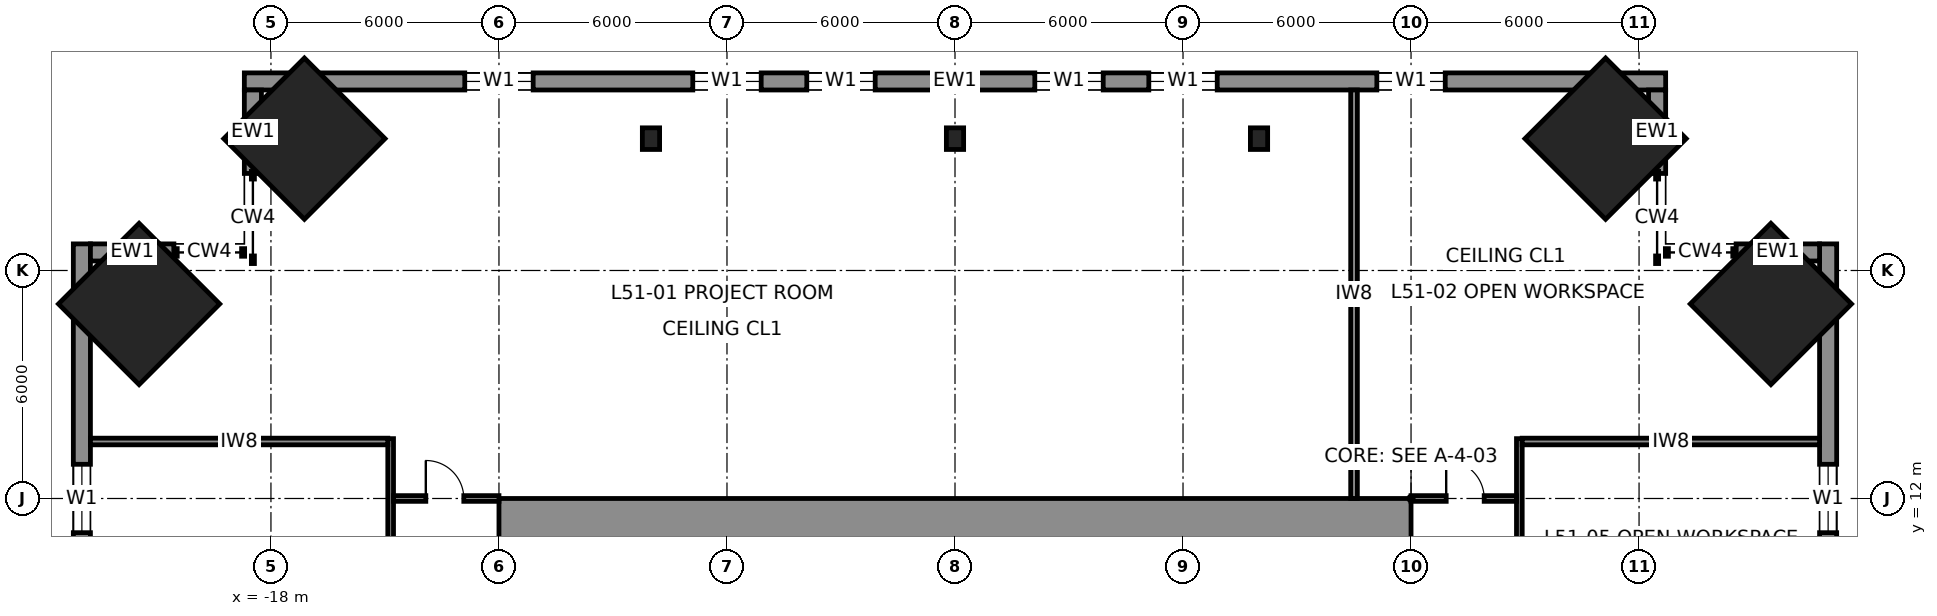
"""IFC4 building model, lengths in metres.
Left out: names, types, materials, properties, quantities, classifications, styles, units other than length and angle.
Written with IfcOpenShell. Run it as: python <this file> out.ifc"""

import sys

from ifc_helpers import new_model, si_unit, direction, frame, frame_2d, origin, origin_2d, place, context, subcontext, project, spatial, rectangle, i_section, extrude, element, fill, save


model = new_model("IFC4")
c1 = context("Model", 3, precision=1e-05, world=origin(), true_north=direction((0.0, 1.0)))
c2 = subcontext(c1, "Body", "Model", "MODEL_VIEW")
j1 = project(units=[si_unit("LENGTHUNIT", "METRE"), si_unit("PLANEANGLEUNIT", "RADIAN")], contexts=[c1])
p1 = place(None, origin())
s1 = spatial("IfcSite", under=j1, at=p1, CompositionType="ELEMENT")
p2 = place(p1, origin())
s2 = spatial("IfcBuilding", under=s1, at=p2, CompositionType="ELEMENT")
p3 = place(p2, frame((0.0, 0.0, 233.8)))
s3 = spatial("IfcBuildingStorey", under=s2, at=p3, CompositionType="ELEMENT", Elevation=233.8)
for number, where, z_axis, x_axis in (
    (1, (17.119, 21.469, 0.0), (-0.04, -0.04, 0.998), (0.707, -0.708, 0.0)),
    (2, (21.469, 17.119, 0.0), (-0.04, -0.04, 0.998), (0.708, -0.707, 0.0)),
    (3, (-21.469, 17.119, 0.0), (0.04, -0.04, 0.998), (0.708, 0.707, 0.0)),
    (4, (-17.119, 21.469, 0.0), (0.04, -0.04, 0.998), (0.707, 0.708, 0.0)),
):
    element("IfcColumn", number, at=place(p3, frame(where, z_axis=z_axis, x_axis=x_axis)), inside=s3, PredefinedType="COLUMN", context=c2, shape_type="SweptSolid", body=[
        extrude(rectangle(XDim=3.0, YDim=3.0, at=origin_2d()), origin(), (0.0, 0.0, 1.0), 4.007),
    ])
for number, where, z_axis, x_axis in (
    (5, (0.0, 21.469, 0.0), (0.0, -0.04, 0.999), (1.0, 0.0, 0.0)),
    (6, (8.0, 21.469, 0.0), (0.0, -0.04, 0.999), (1.0, 0.0, 0.0)),
    (7, (-8.0, 21.469, 0.0), (0.0, -0.04, 0.999), (1.0, 0.0, 0.0)),
):
    element("IfcColumn", number, at=place(p3, frame(where, z_axis=z_axis, x_axis=x_axis)), inside=s3, PredefinedType="COLUMN", context=c2, shape_type="SweptSolid", body=[
        extrude(i_section(OverallWidth=0.454, OverallDepth=0.569, WebThickness=0.078, FlangeThickness=0.125, at=origin_2d()), origin(), (0.0, 0.0, 1.0), 4.003),
    ])
p4 = place(p3, frame((-12.0, 11.25, 0.0), z_axis=(0.0, 0.0, 1.0), x_axis=(1.0, 0.0, 0.0)))
e8 = element("IfcWall", 8, at=p4, inside=s3, PredefinedType="SHEAR", context=c2, shape_type="SweptSolid", body=[
    extrude(rectangle(XDim=24.0, YDim=1.5, at=frame_2d((12.0, 0.0))), origin(), (0.0, 0.0, 1.0), 4.0),
])
p5 = place(p3, frame((18.7, 22.975, 0.0), z_axis=(0.0, 0.0, 1.0), x_axis=(-1.0, 0.0, 0.0)))
e9 = element("IfcWall", 9, at=p5, inside=s3, PredefinedType="SOLIDWALL", context=c2, shape_type="SweptSolid", body=[
    extrude(rectangle(XDim=37.4, YDim=0.45, at=frame_2d((18.7, 0.0))), origin(), (0.0, 0.0, 1.0), 3.83),
])
p6 = place(p5, frame((5.8, 0.0, 0.7)))
e10 = element("IfcOpeningElement", 10, at=p6, cuts=e9, PredefinedType="OPENING", context=c2, shape_type="SweptSolid", body=[
    extrude(rectangle(XDim=1.8, YDim=2.6, at=frame_2d((0.9, 1.3))), frame((0.0, 0.235, 0.0), z_axis=(0.0, -1.0, 0.0), x_axis=(1.0, 0.0, 0.0)), (0.0, 0.0, 1.0), 0.47),
])
p7 = place(p5, frame((11.8, 0.0, 0.7)))
e11 = element("IfcOpeningElement", 11, at=p7, cuts=e9, PredefinedType="OPENING", context=c2, shape_type="SweptSolid", body=[
    extrude(rectangle(XDim=1.8, YDim=2.6, at=frame_2d((0.9, 1.3))), frame((0.0, 0.235, 0.0), z_axis=(0.0, -1.0, 0.0), x_axis=(1.0, 0.0, 0.0)), (0.0, 0.0, 1.0), 0.47),
])
p8 = place(p5, frame((14.8, 0.0, 0.7)))
e12 = element("IfcOpeningElement", 12, at=p8, cuts=e9, PredefinedType="OPENING", context=c2, shape_type="SweptSolid", body=[
    extrude(rectangle(XDim=1.8, YDim=2.6, at=frame_2d((0.9, 1.3))), frame((0.0, 0.235, 0.0), z_axis=(0.0, -1.0, 0.0), x_axis=(1.0, 0.0, 0.0)), (0.0, 0.0, 1.0), 0.47),
])
p9 = place(p5, frame((20.8, 0.0, 0.7)))
e13 = element("IfcOpeningElement", 13, at=p9, cuts=e9, PredefinedType="OPENING", context=c2, shape_type="SweptSolid", body=[
    extrude(rectangle(XDim=1.8, YDim=2.6, at=frame_2d((0.9, 1.3))), frame((0.0, 0.235, 0.0), z_axis=(0.0, -1.0, 0.0), x_axis=(1.0, 0.0, 0.0)), (0.0, 0.0, 1.0), 0.47),
])
p10 = place(p5, frame((23.8, 0.0, 0.7)))
e14 = element("IfcOpeningElement", 14, at=p10, cuts=e9, PredefinedType="OPENING", context=c2, shape_type="SweptSolid", body=[
    extrude(rectangle(XDim=1.8, YDim=2.6, at=frame_2d((0.9, 1.3))), frame((0.0, 0.235, 0.0), z_axis=(0.0, -1.0, 0.0), x_axis=(1.0, 0.0, 0.0)), (0.0, 0.0, 1.0), 0.47),
])
p11 = place(p5, frame((29.8, 0.0, 0.7)))
e15 = element("IfcOpeningElement", 15, at=p11, cuts=e9, PredefinedType="OPENING", context=c2, shape_type="SweptSolid", body=[
    extrude(rectangle(XDim=1.8, YDim=2.6, at=frame_2d((0.9, 1.3))), frame((0.0, 0.235, 0.0), z_axis=(0.0, -1.0, 0.0), x_axis=(1.0, 0.0, 0.0)), (0.0, 0.0, 1.0), 0.47),
])
p12 = place(p3, frame((22.975, -18.7, 0.0), z_axis=(0.0, 0.0, 1.0), x_axis=(0.0, 1.0, 0.0)))
e16 = element("IfcWall", 16, at=p12, inside=s3, PredefinedType="SOLIDWALL", context=c2, shape_type="SweptSolid", body=[
    extrude(rectangle(XDim=37.4, YDim=0.45, at=frame_2d((18.7, 0.0))), origin(), (0.0, 0.0, 1.0), 3.83),
])
p13 = place(p12, frame((5.8, 0.0, 0.7)))
e17 = element("IfcOpeningElement", 17, at=p13, cuts=e16, PredefinedType="OPENING", context=c2, shape_type="SweptSolid", body=[
    extrude(rectangle(XDim=1.8, YDim=2.6, at=frame_2d((0.9, 1.3))), frame((0.0, 0.235, 0.0), z_axis=(0.0, -1.0, 0.0), x_axis=(1.0, 0.0, 0.0)), (0.0, 0.0, 1.0), 0.47),
])
p14 = place(p12, frame((11.8, 0.0, 0.7)))
e18 = element("IfcOpeningElement", 18, at=p14, cuts=e16, PredefinedType="OPENING", context=c2, shape_type="SweptSolid", body=[
    extrude(rectangle(XDim=1.8, YDim=2.6, at=frame_2d((0.9, 1.3))), frame((0.0, 0.235, 0.0), z_axis=(0.0, -1.0, 0.0), x_axis=(1.0, 0.0, 0.0)), (0.0, 0.0, 1.0), 0.47),
])
p15 = place(p12, frame((14.8, 0.0, 0.7)))
e19 = element("IfcOpeningElement", 19, at=p15, cuts=e16, PredefinedType="OPENING", context=c2, shape_type="SweptSolid", body=[
    extrude(rectangle(XDim=1.8, YDim=2.6, at=frame_2d((0.9, 1.3))), frame((0.0, 0.235, 0.0), z_axis=(0.0, -1.0, 0.0), x_axis=(1.0, 0.0, 0.0)), (0.0, 0.0, 1.0), 0.47),
])
p16 = place(p12, frame((20.8, 0.0, 0.7)))
e20 = element("IfcOpeningElement", 20, at=p16, cuts=e16, PredefinedType="OPENING", context=c2, shape_type="SweptSolid", body=[
    extrude(rectangle(XDim=1.8, YDim=2.6, at=frame_2d((0.9, 1.3))), frame((0.0, 0.235, 0.0), z_axis=(0.0, -1.0, 0.0), x_axis=(1.0, 0.0, 0.0)), (0.0, 0.0, 1.0), 0.47),
])
p17 = place(p12, frame((23.8, 0.0, 0.7)))
e21 = element("IfcOpeningElement", 21, at=p17, cuts=e16, PredefinedType="OPENING", context=c2, shape_type="SweptSolid", body=[
    extrude(rectangle(XDim=1.8, YDim=2.6, at=frame_2d((0.9, 1.3))), frame((0.0, 0.235, 0.0), z_axis=(0.0, -1.0, 0.0), x_axis=(1.0, 0.0, 0.0)), (0.0, 0.0, 1.0), 0.47),
])
p18 = place(p12, frame((29.8, 0.0, 0.7)))
e22 = element("IfcOpeningElement", 22, at=p18, cuts=e16, PredefinedType="OPENING", context=c2, shape_type="SweptSolid", body=[
    extrude(rectangle(XDim=1.8, YDim=2.6, at=frame_2d((0.9, 1.3))), frame((0.0, 0.235, 0.0), z_axis=(0.0, -1.0, 0.0), x_axis=(1.0, 0.0, 0.0)), (0.0, 0.0, 1.0), 0.47),
])
p19 = place(p3, frame((-22.975, 18.7, 0.0), z_axis=(0.0, 0.0, 1.0), x_axis=(0.0, -1.0, 0.0)))
e23 = element("IfcWall", 23, at=p19, inside=s3, PredefinedType="SOLIDWALL", context=c2, shape_type="SweptSolid", body=[
    extrude(rectangle(XDim=37.4, YDim=0.45, at=frame_2d((18.7, 0.0))), origin(), (0.0, 0.0, 1.0), 3.83),
])
p20 = place(p19, frame((5.8, 0.0, 0.7)))
e24 = element("IfcOpeningElement", 24, at=p20, cuts=e23, PredefinedType="OPENING", context=c2, shape_type="SweptSolid", body=[
    extrude(rectangle(XDim=1.8, YDim=2.6, at=frame_2d((0.9, 1.3))), frame((0.0, 0.235, 0.0), z_axis=(0.0, -1.0, 0.0), x_axis=(1.0, 0.0, 0.0)), (0.0, 0.0, 1.0), 0.47),
])
p21 = place(p19, frame((11.8, 0.0, 0.7)))
e25 = element("IfcOpeningElement", 25, at=p21, cuts=e23, PredefinedType="OPENING", context=c2, shape_type="SweptSolid", body=[
    extrude(rectangle(XDim=1.8, YDim=2.6, at=frame_2d((0.9, 1.3))), frame((0.0, 0.235, 0.0), z_axis=(0.0, -1.0, 0.0), x_axis=(1.0, 0.0, 0.0)), (0.0, 0.0, 1.0), 0.47),
])
p22 = place(p19, frame((14.8, 0.0, 0.7)))
e26 = element("IfcOpeningElement", 26, at=p22, cuts=e23, PredefinedType="OPENING", context=c2, shape_type="SweptSolid", body=[
    extrude(rectangle(XDim=1.8, YDim=2.6, at=frame_2d((0.9, 1.3))), frame((0.0, 0.235, 0.0), z_axis=(0.0, -1.0, 0.0), x_axis=(1.0, 0.0, 0.0)), (0.0, 0.0, 1.0), 0.47),
])
p23 = place(p19, frame((20.8, 0.0, 0.7)))
e27 = element("IfcOpeningElement", 27, at=p23, cuts=e23, PredefinedType="OPENING", context=c2, shape_type="SweptSolid", body=[
    extrude(rectangle(XDim=1.8, YDim=2.6, at=frame_2d((0.9, 1.3))), frame((0.0, 0.235, 0.0), z_axis=(0.0, -1.0, 0.0), x_axis=(1.0, 0.0, 0.0)), (0.0, 0.0, 1.0), 0.47),
])
p24 = place(p19, frame((23.8, 0.0, 0.7)))
e28 = element("IfcOpeningElement", 28, at=p24, cuts=e23, PredefinedType="OPENING", context=c2, shape_type="SweptSolid", body=[
    extrude(rectangle(XDim=1.8, YDim=2.6, at=frame_2d((0.9, 1.3))), frame((0.0, 0.235, 0.0), z_axis=(0.0, -1.0, 0.0), x_axis=(1.0, 0.0, 0.0)), (0.0, 0.0, 1.0), 0.47),
])
p25 = place(p19, frame((29.8, 0.0, 0.7)))
e29 = element("IfcOpeningElement", 29, at=p25, cuts=e23, PredefinedType="OPENING", context=c2, shape_type="SweptSolid", body=[
    extrude(rectangle(XDim=1.8, YDim=2.6, at=frame_2d((0.9, 1.3))), frame((0.0, 0.235, 0.0), z_axis=(0.0, -1.0, 0.0), x_axis=(1.0, 0.0, 0.0)), (0.0, 0.0, 1.0), 0.47),
])
for number, where, z_axis, x_axis in (
    (30, (18.475, 20.554, 0.0), (0.0, 0.0, 1.0), (0.0, 1.0, 0.0)),
    (31, (20.554, 18.475, 0.0), (0.0, 0.0, 1.0), (1.0, 0.0, 0.0)),
    (32, (-18.475, 20.554, 0.0), (0.0, 0.0, 1.0), (0.0, 1.0, 0.0)),
    (33, (-20.554, 18.475, 0.0), (0.0, 0.0, 1.0), (-1.0, 0.0, 0.0)),
):
    element("IfcWall", number, at=place(p3, frame(where, z_axis=z_axis, x_axis=x_axis)), inside=s3, PredefinedType="SOLIDWALL", context=c2, shape_type="SweptSolid", body=[
        extrude(rectangle(XDim=2.196, YDim=0.45, at=frame_2d((1.098, 0.0))), origin(), (0.0, 0.0, 1.0), 3.83),
    ])
p26 = place(p3, frame((14.85, -13.575, 0.0), z_axis=(0.0, 0.0, 1.0), x_axis=(0.0, 1.0, 0.0)))
e34 = element("IfcWall", 34, at=p26, inside=s3, PredefinedType="PARTITIONING", context=c2, shape_type="SweptSolid", body=[
    extrude(rectangle(XDim=27.15, YDim=0.15, at=frame_2d((13.575, 0.0))), origin(), (0.0, 0.0, 1.0), 3.83),
])
p27 = place(p26, frame((21.125, 0.0, 0.0)))
e35 = element("IfcOpeningElement", 35, at=p27, cuts=e34, PredefinedType="OPENING", context=c2, shape_type="SweptSolid", body=[
    extrude(rectangle(XDim=1.6, YDim=2.3, at=frame_2d((0.8, 1.15))), frame((0.0, 0.085, 0.0), z_axis=(0.0, -1.0, 0.0), x_axis=(1.0, 0.0, 0.0)), (0.0, 0.0, 1.0), 0.17),
])
p28 = place(p26, frame((9.325, 0.0, 0.0)))
e36 = element("IfcOpeningElement", 36, at=p28, cuts=e34, PredefinedType="OPENING", context=c2, shape_type="SweptSolid", body=[
    extrude(rectangle(XDim=1.0, YDim=2.3, at=frame_2d((0.5, 1.15))), frame((0.0, 0.085, 0.0), z_axis=(0.0, -1.0, 0.0), x_axis=(1.0, 0.0, 0.0)), (0.0, 0.0, 1.0), 0.17),
])
p29 = place(p26, frame((16.575, 0.0, 0.0)))
e37 = element("IfcOpeningElement", 37, at=p29, cuts=e34, PredefinedType="OPENING", context=c2, shape_type="SweptSolid", body=[
    extrude(rectangle(XDim=1.0, YDim=2.3, at=frame_2d((0.5, 1.15))), frame((0.0, 0.085, 0.0), z_axis=(0.0, -1.0, 0.0), x_axis=(1.0, 0.0, 0.0)), (0.0, 0.0, 1.0), 0.17),
])
p30 = place(p3, frame((-14.85, 13.575, 0.0), z_axis=(0.0, 0.0, 1.0), x_axis=(0.0, -1.0, 0.0)))
e38 = element("IfcWall", 38, at=p30, inside=s3, PredefinedType="PARTITIONING", context=c2, shape_type="SweptSolid", body=[
    extrude(rectangle(XDim=27.15, YDim=0.15, at=frame_2d((13.575, 0.0))), origin(), (0.0, 0.0, 1.0), 3.83),
])
p31 = place(p30, frame((21.125, 0.0, 0.0)))
e39 = element("IfcOpeningElement", 39, at=p31, cuts=e38, PredefinedType="OPENING", context=c2, shape_type="SweptSolid", body=[
    extrude(rectangle(XDim=1.6, YDim=2.3, at=frame_2d((0.8, 1.15))), frame((0.0, 0.085, 0.0), z_axis=(0.0, -1.0, 0.0), x_axis=(1.0, 0.0, 0.0)), (0.0, 0.0, 1.0), 0.17),
])
p32 = place(p30, frame((16.575, 0.0, 0.0)))
e40 = element("IfcOpeningElement", 40, at=p32, cuts=e38, PredefinedType="OPENING", context=c2, shape_type="SweptSolid", body=[
    extrude(rectangle(XDim=1.0, YDim=2.3, at=frame_2d((0.5, 1.15))), frame((0.0, 0.085, 0.0), z_axis=(0.0, -1.0, 0.0), x_axis=(1.0, 0.0, 0.0)), (0.0, 0.0, 1.0), 0.17),
])
p33 = place(p30, frame((9.325, 0.0, 0.0)))
e41 = element("IfcOpeningElement", 41, at=p33, cuts=e38, PredefinedType="OPENING", context=c2, shape_type="SweptSolid", body=[
    extrude(rectangle(XDim=1.0, YDim=2.3, at=frame_2d((0.5, 1.15))), frame((0.0, 0.085, 0.0), z_axis=(0.0, -1.0, 0.0), x_axis=(1.0, 0.0, 0.0)), (0.0, 0.0, 1.0), 0.17),
])
p34 = place(p3, frame((12.0, 12.0, 0.0), z_axis=(0.0, 0.0, 1.0), x_axis=(1.0, 0.0, 0.0)))
e42 = element("IfcWall", 42, at=p34, inside=s3, PredefinedType="PARTITIONING", context=c2, shape_type="SweptSolid", body=[
    extrude(rectangle(XDim=2.775, YDim=0.15, at=frame_2d((1.387, 0.0))), origin(), (0.0, 0.0, 1.0), 3.83),
])
p35 = place(p34, frame((0.925, 0.0, 0.0)))
e43 = element("IfcOpeningElement", 43, at=p35, cuts=e42, PredefinedType="OPENING", context=c2, shape_type="SweptSolid", body=[
    extrude(rectangle(XDim=1.0, YDim=2.3, at=frame_2d((0.5, 1.15))), frame((0.0, 0.085, 0.0), z_axis=(0.0, -1.0, 0.0), x_axis=(1.0, 0.0, 0.0)), (0.0, 0.0, 1.0), 0.17),
])
p36 = place(p3, frame((-14.775, 12.0, 0.0), z_axis=(0.0, 0.0, 1.0), x_axis=(1.0, 0.0, 0.0)))
e44 = element("IfcWall", 44, at=p36, inside=s3, PredefinedType="PARTITIONING", context=c2, shape_type="SweptSolid", body=[
    extrude(rectangle(XDim=2.775, YDim=0.15, at=frame_2d((1.387, 0.0))), origin(), (0.0, 0.0, 1.0), 3.83),
])
p37 = place(p36, frame((0.85, 0.0, 0.0)))
e45 = element("IfcOpeningElement", 45, at=p37, cuts=e44, PredefinedType="OPENING", context=c2, shape_type="SweptSolid", body=[
    extrude(rectangle(XDim=1.0, YDim=2.3, at=frame_2d((0.5, 1.15))), frame((0.0, 0.085, 0.0), z_axis=(0.0, -1.0, 0.0), x_axis=(1.0, 0.0, 0.0)), (0.0, 0.0, 1.0), 0.17),
])
for number, where, z_axis, x_axis in (
    (46, (14.925, 13.5, 0.0), (0.0, 0.0, 1.0), (1.0, 0.0, 0.0)),
    (47, (-22.75, 13.5, 0.0), (0.0, 0.0, 1.0), (1.0, 0.0, 0.0)),
):
    element("IfcWall", number, at=place(p3, frame(where, z_axis=z_axis, x_axis=x_axis)), inside=s3, PredefinedType="PARTITIONING", context=c2, shape_type="SweptSolid", body=[
        extrude(rectangle(XDim=7.825, YDim=0.175, at=frame_2d((3.913, 0.0))), origin(), (0.0, 0.0, 1.0), 3.83),
    ])
p38 = place(p3, frame((10.5, 12.0, 0.0), z_axis=(0.0, 0.0, 1.0), x_axis=(0.0, 1.0, 0.0)))
e48 = element("IfcWall", 48, at=p38, inside=s3, PredefinedType="PARTITIONING", context=c2, shape_type="SweptSolid", body=[
    extrude(rectangle(XDim=10.75, YDim=0.175, at=frame_2d((5.375, 0.0))), origin(), (0.0, 0.0, 1.0), 3.83),
])
p39 = place(p6, origin())
e49 = element("IfcWindow", 49, at=p39, inside=s3, PartitioningType="SINGLE_PANEL", PredefinedType="WINDOW", context=c2, shape_type="SweptSolid", body=[
    extrude(rectangle(XDim=1.8, YDim=2.6, at=frame_2d((0.9, 1.3))), frame((0.0, 0.03, 0.0), z_axis=(0.0, -1.0, 0.0), x_axis=(1.0, 0.0, 0.0)), (0.0, 0.0, 1.0), 0.06),
])
fill(e10, e49)
p40 = place(p7, origin())
e50 = element("IfcWindow", 50, at=p40, inside=s3, PartitioningType="SINGLE_PANEL", PredefinedType="WINDOW", context=c2, shape_type="SweptSolid", body=[
    extrude(rectangle(XDim=1.8, YDim=2.6, at=frame_2d((0.9, 1.3))), frame((0.0, 0.03, 0.0), z_axis=(0.0, -1.0, 0.0), x_axis=(1.0, 0.0, 0.0)), (0.0, 0.0, 1.0), 0.06),
])
fill(e11, e50)
p41 = place(p8, origin())
e51 = element("IfcWindow", 51, at=p41, inside=s3, PartitioningType="SINGLE_PANEL", PredefinedType="WINDOW", context=c2, shape_type="SweptSolid", body=[
    extrude(rectangle(XDim=1.8, YDim=2.6, at=frame_2d((0.9, 1.3))), frame((0.0, 0.03, 0.0), z_axis=(0.0, -1.0, 0.0), x_axis=(1.0, 0.0, 0.0)), (0.0, 0.0, 1.0), 0.06),
])
fill(e12, e51)
p42 = place(p9, origin())
e52 = element("IfcWindow", 52, at=p42, inside=s3, PartitioningType="SINGLE_PANEL", PredefinedType="WINDOW", context=c2, shape_type="SweptSolid", body=[
    extrude(rectangle(XDim=1.8, YDim=2.6, at=frame_2d((0.9, 1.3))), frame((0.0, 0.03, 0.0), z_axis=(0.0, -1.0, 0.0), x_axis=(1.0, 0.0, 0.0)), (0.0, 0.0, 1.0), 0.06),
])
fill(e13, e52)
p43 = place(p10, origin())
e53 = element("IfcWindow", 53, at=p43, inside=s3, PartitioningType="SINGLE_PANEL", PredefinedType="WINDOW", context=c2, shape_type="SweptSolid", body=[
    extrude(rectangle(XDim=1.8, YDim=2.6, at=frame_2d((0.9, 1.3))), frame((0.0, 0.03, 0.0), z_axis=(0.0, -1.0, 0.0), x_axis=(1.0, 0.0, 0.0)), (0.0, 0.0, 1.0), 0.06),
])
fill(e14, e53)
p44 = place(p11, origin())
e54 = element("IfcWindow", 54, at=p44, inside=s3, PartitioningType="SINGLE_PANEL", PredefinedType="WINDOW", context=c2, shape_type="SweptSolid", body=[
    extrude(rectangle(XDim=1.8, YDim=2.6, at=frame_2d((0.9, 1.3))), frame((0.0, 0.03, 0.0), z_axis=(0.0, -1.0, 0.0), x_axis=(1.0, 0.0, 0.0)), (0.0, 0.0, 1.0), 0.06),
])
fill(e15, e54)
p45 = place(p18, origin())
e55 = element("IfcWindow", 55, at=p45, inside=s3, PartitioningType="SINGLE_PANEL", PredefinedType="WINDOW", context=c2, shape_type="SweptSolid", body=[
    extrude(rectangle(XDim=1.8, YDim=2.6, at=frame_2d((0.9, 1.3))), frame((0.0, 0.03, 0.0), z_axis=(0.0, -1.0, 0.0), x_axis=(1.0, 0.0, 0.0)), (0.0, 0.0, 1.0), 0.06),
])
fill(e22, e55)
p46 = place(p20, origin())
e56 = element("IfcWindow", 56, at=p46, inside=s3, PartitioningType="SINGLE_PANEL", PredefinedType="WINDOW", context=c2, shape_type="SweptSolid", body=[
    extrude(rectangle(XDim=1.8, YDim=2.6, at=frame_2d((0.9, 1.3))), frame((0.0, 0.03, 0.0), z_axis=(0.0, -1.0, 0.0), x_axis=(1.0, 0.0, 0.0)), (0.0, 0.0, 1.0), 0.06),
])
fill(e24, e56)
p47 = place(p37, origin())
e57 = element("IfcDoor", 57, at=p47, inside=s3, OperationType="SINGLE_SWING_LEFT", PredefinedType="DOOR", context=c2, shape_type="SweptSolid", body=[
    extrude(rectangle(XDim=1.0, YDim=2.3, at=frame_2d((0.5, 1.15))), frame((0.0, 0.025, 0.0), z_axis=(0.0, -1.0, 0.0), x_axis=(1.0, 0.0, 0.0)), (0.0, 0.0, 1.0), 0.05),
])
fill(e45, e57)
p48 = place(p35, origin())
e58 = element("IfcDoor", 58, at=p48, inside=s3, OperationType="SINGLE_SWING_LEFT", PredefinedType="DOOR", context=c2, shape_type="SweptSolid", body=[
    extrude(rectangle(XDim=1.0, YDim=2.3, at=frame_2d((0.5, 1.15))), frame((0.0, 0.025, 0.0), z_axis=(0.0, -1.0, 0.0), x_axis=(1.0, 0.0, 0.0)), (0.0, 0.0, 1.0), 0.05),
])
fill(e43, e58)
save(model, sys.argv[1])
